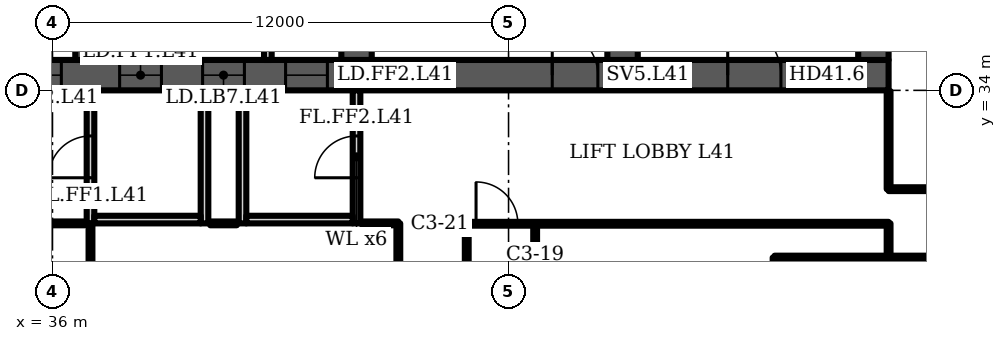
"""IFC4 building model, lengths in metres.
Left out: names, types, materials, properties, quantities, classifications, styles, units other than length and angle.
Written with IfcOpenShell. Run it as: python <this file> out.ifc"""

import sys

from ifc_helpers import new_model, si_unit, direction, frame, frame_2d, origin, place, context, subcontext, project, spatial, polyline, rectangle, outline, extrude, element, fill, save


model = new_model("IFC4")
c1 = context("Model", 3, precision=1e-05, world=origin(), true_north=direction((0.0, 1.0)))
c2 = subcontext(c1, "Body", "Model", "MODEL_VIEW")
j1 = project(units=[si_unit("LENGTHUNIT", "METRE"), si_unit("PLANEANGLEUNIT", "RADIAN")], contexts=[c1])
p1 = place(None, origin())
s1 = spatial("IfcSite", under=j1, at=p1, CompositionType="ELEMENT")
p2 = place(p1, origin())
s2 = spatial("IfcBuilding", under=s1, at=p2, CompositionType="ELEMENT")
p3 = place(p2, frame((0.0, 0.0, 169.9)))
s3 = spatial("IfcBuildingStorey", under=s2, at=p3, CompositionType="ELEMENT", Elevation=169.9)
p4 = place(p3, frame((16.0, 34.4, 0.0), z_axis=(0.0, 0.0, 1.0), x_axis=(1.0, 0.0, 0.0)))
e1 = element("IfcWall", 1, at=p4, inside=s3, PredefinedType="SHEAR", context=c2, shape_type="SweptSolid", body=[
    extrude(rectangle(XDim=42.0, YDim=0.8, at=frame_2d((21.0, 0.0))), origin(), (0.0, 0.0, 1.0), 3.6),
])
p5 = place(p4, frame((1.75, 0.0, 0.0)))
e2 = element("IfcOpeningElement", 2, at=p5, cuts=e1, PredefinedType="OPENING", context=c2, shape_type="SweptSolid", body=[
    extrude(rectangle(XDim=1.0, YDim=2.1, at=frame_2d((0.5, 1.05))), frame((0.0, 0.41, 0.0), z_axis=(0.0, -1.0, 0.0), x_axis=(1.0, 0.0, 0.0)), (0.0, 0.0, 1.0), 0.82),
])
p6 = place(p4, frame((4.65, 0.0, 0.0)))
e3 = element("IfcOpeningElement", 3, at=p6, cuts=e1, PredefinedType="OPENING", context=c2, shape_type="SweptSolid", body=[
    extrude(rectangle(XDim=1.0, YDim=2.1, at=frame_2d((0.5, 1.05))), frame((0.0, 0.41, 0.0), z_axis=(0.0, -1.0, 0.0), x_axis=(1.0, 0.0, 0.0)), (0.0, 0.0, 1.0), 0.82),
])
p7 = place(p4, frame((7.65, 0.0, 0.0)))
e4 = element("IfcOpeningElement", 4, at=p7, cuts=e1, PredefinedType="OPENING", context=c2, shape_type="SweptSolid", body=[
    extrude(rectangle(XDim=1.2, YDim=2.1, at=frame_2d((0.6, 1.05))), frame((0.0, 0.41, 0.0), z_axis=(0.0, -1.0, 0.0), x_axis=(1.0, 0.0, 0.0)), (0.0, 0.0, 1.0), 0.82),
])
p8 = place(p4, frame((14.767, 0.0, 0.0)))
e5 = element("IfcOpeningElement", 5, at=p8, cuts=e1, PredefinedType="OPENING", context=c2, shape_type="SweptSolid", body=[
    extrude(rectangle(XDim=1.1, YDim=2.1, at=frame_2d((0.55, 1.05))), frame((0.0, 0.41, 0.0), z_axis=(0.0, -1.0, 0.0), x_axis=(1.0, 0.0, 0.0)), (0.0, 0.0, 1.0), 0.82),
])
p9 = place(p4, frame((19.133, 0.0, 0.0)))
e6 = element("IfcOpeningElement", 6, at=p9, cuts=e1, PredefinedType="OPENING", context=c2, shape_type="SweptSolid", body=[
    extrude(rectangle(XDim=1.1, YDim=2.1, at=frame_2d((0.55, 1.05))), frame((0.0, 0.41, 0.0), z_axis=(0.0, -1.0, 0.0), x_axis=(1.0, 0.0, 0.0)), (0.0, 0.0, 1.0), 0.82),
])
p10 = place(p4, frame((16.8, 0.0, 0.0)))
e7 = element("IfcOpeningElement", 7, at=p10, cuts=e1, PredefinedType="OPENING", context=c2, shape_type="SweptSolid", body=[
    extrude(rectangle(XDim=1.4, YDim=2.1, at=frame_2d((0.7, 1.05))), frame((0.0, 0.41, 0.0), z_axis=(0.0, -1.0, 0.0), x_axis=(1.0, 0.0, 0.0)), (0.0, 0.0, 1.0), 0.82),
])
p11 = place(p4, frame((21.767, 0.0, 0.0)))
e8 = element("IfcOpeningElement", 8, at=p11, cuts=e1, PredefinedType="OPENING", context=c2, shape_type="SweptSolid", body=[
    extrude(rectangle(XDim=1.1, YDim=2.1, at=frame_2d((0.55, 1.05))), frame((0.0, 0.41, 0.0), z_axis=(0.0, -1.0, 0.0), x_axis=(1.0, 0.0, 0.0)), (0.0, 0.0, 1.0), 0.82),
])
p12 = place(p4, frame((23.95, 0.0, 0.0)))
e9 = element("IfcOpeningElement", 9, at=p12, cuts=e1, PredefinedType="OPENING", context=c2, shape_type="SweptSolid", body=[
    extrude(rectangle(XDim=1.1, YDim=2.1, at=frame_2d((0.55, 1.05))), frame((0.0, 0.41, 0.0), z_axis=(0.0, -1.0, 0.0), x_axis=(1.0, 0.0, 0.0)), (0.0, 0.0, 1.0), 0.82),
])
p13 = place(p4, frame((26.133, 0.0, 0.0)))
e10 = element("IfcOpeningElement", 10, at=p13, cuts=e1, PredefinedType="OPENING", context=c2, shape_type="SweptSolid", body=[
    extrude(rectangle(XDim=1.1, YDim=2.1, at=frame_2d((0.55, 1.05))), frame((0.0, 0.41, 0.0), z_axis=(0.0, -1.0, 0.0), x_axis=(1.0, 0.0, 0.0)), (0.0, 0.0, 1.0), 0.82),
])
p14 = place(p4, frame((33.15, 0.0, 0.0)))
e11 = element("IfcOpeningElement", 11, at=p14, cuts=e1, PredefinedType="OPENING", context=c2, shape_type="SweptSolid", body=[
    extrude(rectangle(XDim=1.2, YDim=2.1, at=frame_2d((0.6, 1.05))), frame((0.0, 0.41, 0.0), z_axis=(0.0, -1.0, 0.0), x_axis=(1.0, 0.0, 0.0)), (0.0, 0.0, 1.0), 0.82),
])
p15 = place(p4, frame((37.767, 0.0, 0.0)))
e12 = element("IfcOpeningElement", 12, at=p15, cuts=e1, PredefinedType="OPENING", context=c2, shape_type="SweptSolid", body=[
    extrude(rectangle(XDim=1.4, YDim=2.1, at=frame_2d((0.7, 1.05))), frame((0.0, 0.41, 0.0), z_axis=(0.0, -1.0, 0.0), x_axis=(1.0, 0.0, 0.0)), (0.0, 0.0, 1.0), 0.82),
])
p16 = place(p3, frame((37.0, 34.8, 0.0), z_axis=(0.0, 0.0, 1.0), x_axis=(0.0, 1.0, 0.0)))
e13 = element("IfcWall", 13, at=p16, inside=s3, PredefinedType="SHEAR", context=c2, shape_type="SweptSolid", body=[
    extrude(rectangle(XDim=14.987, YDim=0.8, at=frame_2d((7.493, 0.0))), origin(), (0.0, 0.0, 1.0), 3.6),
])
p17 = place(p16, frame((11.312, 0.0, 0.0)))
e14 = element("IfcOpeningElement", 14, at=p17, cuts=e13, PredefinedType="OPENING", context=c2, shape_type="SweptSolid", body=[
    extrude(rectangle(XDim=1.0, YDim=2.1, at=frame_2d((0.5, 1.05))), frame((0.0, 0.41, 0.0), z_axis=(0.0, -1.0, 0.0), x_axis=(1.0, 0.0, 0.0)), (0.0, 0.0, 1.0), 0.82),
])
p18 = place(p16, frame((3.6, 0.0, 0.0)))
e15 = element("IfcOpeningElement", 15, at=p18, cuts=e13, PredefinedType="OPENING", context=c2, shape_type="SweptSolid", body=[
    extrude(rectangle(XDim=1.1, YDim=2.1, at=frame_2d((0.55, 1.05))), frame((0.0, 0.41, 0.0), z_axis=(0.0, -1.0, 0.0), x_axis=(1.0, 0.0, 0.0)), (0.0, 0.0, 1.0), 0.82),
])
p19 = place(p3, frame((44.0, 34.8, 0.0), z_axis=(0.0, 0.0, 1.0), x_axis=(0.0, 1.0, 0.0)))
e16 = element("IfcWall", 16, at=p19, inside=s3, PredefinedType="SHEAR", context=c2, shape_type="SweptSolid", body=[
    extrude(rectangle(XDim=14.374, YDim=0.8, at=frame_2d((7.187, 0.0))), origin(), (0.0, 0.0, 1.0), 3.6),
])
p20 = place(p19, frame((11.312, 0.0, 0.0)))
e17 = element("IfcOpeningElement", 17, at=p20, cuts=e16, PredefinedType="OPENING", context=c2, shape_type="SweptSolid", body=[
    extrude(rectangle(XDim=1.0, YDim=2.1, at=frame_2d((0.5, 1.05))), frame((0.0, 0.41, 0.0), z_axis=(0.0, -1.0, 0.0), x_axis=(1.0, 0.0, 0.0)), (0.0, 0.0, 1.0), 0.82),
])
p21 = place(p19, frame((3.6, 0.0, 0.0)))
e18 = element("IfcOpeningElement", 18, at=p21, cuts=e16, PredefinedType="OPENING", context=c2, shape_type="SweptSolid", body=[
    extrude(rectangle(XDim=1.1, YDim=2.1, at=frame_2d((0.55, 1.05))), frame((0.0, 0.41, 0.0), z_axis=(0.0, -1.0, 0.0), x_axis=(1.0, 0.0, 0.0)), (0.0, 0.0, 1.0), 0.82),
])
p22 = place(p3, frame((51.0, 34.8, 0.0), z_axis=(0.0, 0.0, 1.0), x_axis=(0.0, 1.0, 0.0)))
e19 = element("IfcWall", 19, at=p22, inside=s3, PredefinedType="SHEAR", context=c2, shape_type="SweptSolid", body=[
    extrude(rectangle(XDim=13.762, YDim=0.8, at=frame_2d((6.881, 0.0))), origin(), (0.0, 0.0, 1.0), 3.6),
])
p23 = place(p22, frame((3.6, 0.0, 0.0)))
e20 = element("IfcOpeningElement", 20, at=p23, cuts=e19, PredefinedType="OPENING", context=c2, shape_type="SweptSolid", body=[
    extrude(rectangle(XDim=1.1, YDim=2.1, at=frame_2d((0.55, 1.05))), frame((0.0, 0.41, 0.0), z_axis=(0.0, -1.0, 0.0), x_axis=(1.0, 0.0, 0.0)), (0.0, 0.0, 1.0), 0.82),
])
p24 = place(p3, frame((57.6, 34.8, 0.0), z_axis=(0.0, 0.0, 1.0), x_axis=(0.0, 1.0, 0.0)))
e21 = element("IfcWall", 21, at=p24, inside=s3, PredefinedType="SHEAR", context=c2, shape_type="SweptSolid", body=[
    extrude(rectangle(XDim=13.184, YDim=0.8, at=frame_2d((6.592, 0.0))), origin(), (0.0, 0.0, 1.0), 3.6),
])
p25 = place(p3, origin())
e22 = element("IfcWall", 22, at=p25, inside=s3, PredefinedType="PARTITIONING", context=c2, shape_type="SweptSolid", body=[
    extrude(outline(polyline([(34.567, 37.85), (34.767, 37.85), (36.6, 37.85), (36.6, 37.65), (34.767, 37.65), (34.767, 34.8), (34.567, 34.8), (34.567, 37.85)])), origin(), (0.0, 0.0, 1.0), 3.2),
])
p26 = place(p3, origin())
e23 = element("IfcWall", 23, at=p26, inside=s3, PredefinedType="PARTITIONING", context=c2, shape_type="SweptSolid", body=[
    extrude(outline(polyline([(41.567, 37.1), (39.433, 37.1), (39.433, 34.8), (39.233, 34.8), (39.233, 37.65), (37.4, 37.65), (37.4, 37.85), (39.233, 37.85), (39.433, 37.85), (39.433, 37.3), (41.567, 37.3), (41.567, 37.55), (41.767, 37.55), (43.6, 37.55), (43.6, 37.35), (41.767, 37.35), (41.767, 34.8), (41.567, 34.8), (41.567, 37.1)])), origin(), (0.0, 0.0, 1.0), 3.2),
])
p27 = place(p3, frame((37.0, 30.5, 0.0), z_axis=(0.0, 0.0, 1.0), x_axis=(0.0, 1.0, 0.0)))
e24 = element("IfcWall", 24, at=p27, inside=s3, PredefinedType="PARTITIONING", context=c2, shape_type="SweptSolid", body=[
    extrude(rectangle(XDim=3.5, YDim=0.2, at=frame_2d((1.75, 0.0))), origin(), (0.0, 0.0, 1.0), 3.2),
])
p28 = place(p27, frame((1.2, 0.0, 0.0)))
e25 = element("IfcOpeningElement", 25, at=p28, cuts=e24, PredefinedType="OPENING", context=c2, shape_type="SweptSolid", body=[
    extrude(rectangle(XDim=1.1, YDim=2.1, at=frame_2d((0.55, 1.05))), frame((0.0, 0.11, 0.0), z_axis=(0.0, -1.0, 0.0), x_axis=(1.0, 0.0, 0.0)), (0.0, 0.0, 1.0), 0.22),
])
p29 = place(p3, frame((40.0, 30.5, 0.0), z_axis=(0.0, 0.0, 1.0), x_axis=(0.0, 1.0, 0.0)))
e26 = element("IfcWall", 26, at=p29, inside=s3, PredefinedType="PARTITIONING", context=c2, shape_type="SweptSolid", body=[
    extrude(rectangle(XDim=3.5, YDim=0.2, at=frame_2d((1.75, 0.0))), origin(), (0.0, 0.0, 1.0), 3.2),
])
p30 = place(p3, frame((37.1, 30.6, 0.0), z_axis=(0.0, 0.0, 1.0), x_axis=(1.0, 0.0, 0.0)))
e27 = element("IfcWall", 27, at=p30, inside=s3, PredefinedType="PARTITIONING", context=c2, shape_type="SweptSolid", body=[
    extrude(rectangle(XDim=2.8, YDim=0.2, at=frame_2d((1.4, 0.0))), origin(), (0.0, 0.0, 1.0), 3.2),
])
p31 = place(p3, frame((41.0, 30.5, 0.0), z_axis=(0.0, 0.0, 1.0), x_axis=(0.0, 1.0, 0.0)))
e28 = element("IfcWall", 28, at=p31, inside=s3, PredefinedType="PARTITIONING", context=c2, shape_type="SweptSolid", body=[
    extrude(rectangle(XDim=3.5, YDim=0.2, at=frame_2d((1.75, 0.0))), origin(), (0.0, 0.0, 1.0), 3.2),
])
p32 = place(p3, frame((44.0, 30.5, 0.0), z_axis=(0.0, 0.0, 1.0), x_axis=(0.0, 1.0, 0.0)))
e29 = element("IfcWall", 29, at=p32, inside=s3, PredefinedType="PARTITIONING", context=c2, shape_type="SweptSolid", body=[
    extrude(rectangle(XDim=3.5, YDim=0.2, at=frame_2d((1.75, 0.0))), origin(), (0.0, 0.0, 1.0), 3.2),
])
p33 = place(p32, frame((1.2, 0.0, 0.0)))
e30 = element("IfcOpeningElement", 30, at=p33, cuts=e29, PredefinedType="OPENING", context=c2, shape_type="SweptSolid", body=[
    extrude(rectangle(XDim=1.1, YDim=2.1, at=frame_2d((0.55, 1.05))), frame((0.0, 0.11, 0.0), z_axis=(0.0, -1.0, 0.0), x_axis=(1.0, 0.0, 0.0)), (0.0, 0.0, 1.0), 0.22),
])
p34 = place(p3, frame((41.1, 30.6, 0.0), z_axis=(0.0, 0.0, 1.0), x_axis=(1.0, 0.0, 0.0)))
e31 = element("IfcWall", 31, at=p34, inside=s3, PredefinedType="PARTITIONING", context=c2, shape_type="SweptSolid", body=[
    extrude(rectangle(XDim=2.8, YDim=0.2, at=frame_2d((1.4, 0.0))), origin(), (0.0, 0.0, 1.0), 3.2),
])
p35 = place(p3, frame((27.4, 30.5, 0.0), z_axis=(0.0, 0.0, 1.0), x_axis=(1.0, 0.0, 0.0)))
e32 = element("IfcWall", 32, at=p35, inside=s3, PredefinedType="PARTITIONING", context=c2, shape_type="SweptSolid", body=[
    extrude(rectangle(XDim=9.45, YDim=0.1, at=frame_2d((4.725, 0.0))), origin(), (0.0, 0.0, 1.0), 3.2),
])
p36 = place(p35, frame((2.87, 0.0, 0.0)))
e33 = element("IfcOpeningElement", 33, at=p36, cuts=e32, PredefinedType="OPENING", context=c2, shape_type="SweptSolid", body=[
    extrude(rectangle(XDim=1.0, YDim=2.1, at=frame_2d((0.5, 1.05))), frame((0.0, 0.06, 0.0), z_axis=(0.0, -1.0, 0.0), x_axis=(1.0, 0.0, 0.0)), (0.0, 0.0, 1.0), 0.12),
])
p37 = place(p3, frame((37.0, 15.745, 0.0), z_axis=(0.0, 0.0, 1.0), x_axis=(0.0, 1.0, 0.0)))
e34 = element("IfcWall", 34, at=p37, inside=s3, PredefinedType="PARTITIONING", context=c2, shape_type="SweptSolid", body=[
    extrude(rectangle(XDim=14.755, YDim=0.1, at=frame_2d((7.377, 0.0))), origin(), (0.0, 0.0, 1.0), 3.2),
])
p38 = place(p3, frame((45.1, 1.087, 0.0), z_axis=(0.0, 0.0, 1.0), x_axis=(0.0, 1.0, 0.0)))
e35 = element("IfcWall", 35, at=p38, inside=s3, PredefinedType="PARTITIONING", context=c2, shape_type="SweptSolid", body=[
    extrude(rectangle(XDim=29.413, YDim=0.1, at=frame_2d((14.707, 0.0))), origin(), (0.0, 0.0, 1.0), 3.2),
])
p39 = place(p38, frame((6.438, 0.0, 0.0)))
e36 = element("IfcOpeningElement", 36, at=p39, cuts=e35, PredefinedType="OPENING", context=c2, shape_type="SweptSolid", body=[
    extrude(rectangle(XDim=1.8, YDim=2.1, at=frame_2d((0.9, 1.05))), frame((0.0, 0.06, 0.0), z_axis=(0.0, -1.0, 0.0), x_axis=(1.0, 0.0, 0.0)), (0.0, 0.0, 1.0), 0.12),
])
p40 = place(p38, frame((21.993, 0.0, 0.0)))
e37 = element("IfcOpeningElement", 37, at=p40, cuts=e35, PredefinedType="OPENING", context=c2, shape_type="SweptSolid", body=[
    extrude(rectangle(XDim=1.0, YDim=2.1, at=frame_2d((0.5, 1.05))), frame((0.0, 0.06, 0.0), z_axis=(0.0, -1.0, 0.0), x_axis=(1.0, 0.0, 0.0)), (0.0, 0.0, 1.0), 0.12),
])
p41 = place(p3, frame((46.9, 1.087, 0.0), z_axis=(0.0, 0.0, 1.0), x_axis=(0.0, 1.0, 0.0)))
e38 = element("IfcWall", 38, at=p41, inside=s3, PredefinedType="PARTITIONING", context=c2, shape_type="SweptSolid", body=[
    extrude(rectangle(XDim=29.403, YDim=0.1, at=frame_2d((14.702, 0.0))), origin(), (0.0, 0.0, 1.0), 3.2),
])
p42 = place(p41, frame((6.798, 0.0, 0.0)))
e39 = element("IfcOpeningElement", 39, at=p42, cuts=e38, PredefinedType="OPENING", context=c2, shape_type="SweptSolid", body=[
    extrude(rectangle(XDim=1.0, YDim=2.1, at=frame_2d((0.5, 1.05))), frame((0.0, 0.06, 0.0), z_axis=(0.0, -1.0, 0.0), x_axis=(1.0, 0.0, 0.0)), (0.0, 0.0, 1.0), 0.12),
])
p43 = place(p3, frame((46.91, 30.49, 0.0), z_axis=(0.0, 0.0, 1.0), x_axis=(1.0, 0.0, 0.0)))
e40 = element("IfcWall", 40, at=p43, inside=s3, PredefinedType="PARTITIONING", context=c2, shape_type="SweptSolid", body=[
    extrude(rectangle(XDim=11.09, YDim=0.1, at=frame_2d((5.545, 0.0))), origin(), (0.0, 0.0, 1.0), 3.2),
])
p44 = place(p43, frame((0.235, 0.0, 0.0)))
e41 = element("IfcOpeningElement", 41, at=p44, cuts=e40, PredefinedType="OPENING", context=c2, shape_type="SweptSolid", body=[
    extrude(rectangle(XDim=1.1, YDim=2.1, at=frame_2d((0.55, 1.05))), frame((0.0, 0.06, 0.0), z_axis=(0.0, -1.0, 0.0), x_axis=(1.0, 0.0, 0.0)), (0.0, 0.0, 1.0), 0.12),
])
p45 = place(p3, frame((48.7, 15.745, 0.0), z_axis=(0.0, 0.0, 1.0), x_axis=(0.0, 1.0, 0.0)))
e42 = element("IfcWall", 42, at=p45, inside=s3, PredefinedType="PARTITIONING", context=c2, shape_type="SweptSolid", body=[
    extrude(rectangle(XDim=14.745, YDim=0.1, at=frame_2d((7.373, 0.0))), origin(), (0.0, 0.0, 1.0), 3.2),
])
p46 = place(p45, frame((2.469, 0.0, 0.0)))
e43 = element("IfcOpeningElement", 43, at=p46, cuts=e42, PredefinedType="OPENING", context=c2, shape_type="SweptSolid", body=[
    extrude(rectangle(XDim=0.9, YDim=2.1, at=frame_2d((0.45, 1.05))), frame((0.0, 0.06, 0.0), z_axis=(0.0, -1.0, 0.0), x_axis=(1.0, 0.0, 0.0)), (0.0, 0.0, 1.0), 0.12),
])
p47 = place(p45, frame((8.099, 0.0, 0.0)))
e44 = element("IfcOpeningElement", 44, at=p47, cuts=e42, PredefinedType="OPENING", context=c2, shape_type="SweptSolid", body=[
    extrude(rectangle(XDim=0.9, YDim=2.1, at=frame_2d((0.45, 1.05))), frame((0.0, 0.06, 0.0), z_axis=(0.0, -1.0, 0.0), x_axis=(1.0, 0.0, 0.0)), (0.0, 0.0, 1.0), 0.12),
])
p48 = place(p45, frame((12.434, 0.0, 0.0)))
e45 = element("IfcOpeningElement", 45, at=p48, cuts=e42, PredefinedType="OPENING", context=c2, shape_type="SweptSolid", body=[
    extrude(rectangle(XDim=1.0, YDim=2.1, at=frame_2d((0.5, 1.05))), frame((0.0, 0.06, 0.0), z_axis=(0.0, -1.0, 0.0), x_axis=(1.0, 0.0, 0.0)), (0.0, 0.0, 1.0), 0.12),
])
p49 = place(p3, frame((55.0, 15.745, 0.0), z_axis=(0.0, 0.0, 1.0), x_axis=(0.0, 1.0, 0.0)))
e46 = element("IfcWall", 46, at=p49, inside=s3, PredefinedType="PARTITIONING", context=c2, shape_type="SweptSolid", body=[
    extrude(rectangle(XDim=13.855, YDim=0.1, at=frame_2d((6.927, 0.0))), origin(), (0.0, 0.0, 1.0), 3.2),
])
p50 = place(p3, frame((55.0, 29.6, 0.0), z_axis=(0.0, 0.0, 1.0), x_axis=(1.0, 0.0, 0.0)))
e47 = element("IfcWall", 47, at=p50, inside=s3, PredefinedType="PARTITIONING", context=c2, shape_type="SweptSolid", body=[
    extrude(rectangle(XDim=6.44, YDim=0.1, at=frame_2d((3.22, 0.0))), origin(), (0.0, 0.0, 1.0), 3.2),
])
p51 = place(p3, frame((58.0, 29.6, 0.0), z_axis=(0.0, 0.0, 1.0), x_axis=(0.0, 1.0, 0.0)))
e48 = element("IfcWall", 48, at=p51, inside=s3, PredefinedType="PARTITIONING", context=c2, shape_type="SweptSolid", body=[
    extrude(rectangle(XDim=0.9, YDim=0.1, at=frame_2d((0.45, 0.0))), origin(), (0.0, 0.0, 1.0), 3.2),
])
p52 = place(p3, frame((58.0, 31.4, 0.0), z_axis=(0.0, 0.0, 1.0), x_axis=(0.0, 1.0, 0.0)))
e49 = element("IfcWall", 49, at=p52, inside=s3, PredefinedType="PARTITIONING", context=c2, shape_type="SweptSolid", body=[
    extrude(rectangle(XDim=2.58, YDim=0.1, at=frame_2d((1.29, 0.0))), origin(), (0.0, 0.0, 1.0), 3.2),
])
p53 = place(p3, frame((58.0, 31.4, 0.0), z_axis=(0.0, 0.0, 1.0), x_axis=(1.0, 0.0, 0.0)))
e50 = element("IfcWall", 50, at=p53, inside=s3, PredefinedType="PARTITIONING", context=c2, shape_type="SweptSolid", body=[
    extrude(rectangle(XDim=8.4, YDim=0.1, at=frame_2d((4.2, 0.0))), origin(), (0.0, 0.0, 1.0), 3.2),
])
p54 = place(p53, frame((3.98, 0.0, 0.0)))
e51 = element("IfcOpeningElement", 51, at=p54, cuts=e50, PredefinedType="OPENING", context=c2, shape_type="SweptSolid", body=[
    extrude(rectangle(XDim=1.8, YDim=2.1, at=frame_2d((0.9, 1.05))), frame((0.0, 0.06, 0.0), z_axis=(0.0, -1.0, 0.0), x_axis=(1.0, 0.0, 0.0)), (0.0, 0.0, 1.0), 0.12),
])
p55 = place(p3, frame((40.15, 30.5, 0.0), z_axis=(0.0, 0.0, 1.0), x_axis=(1.0, 0.0, 0.0)))
e52 = element("IfcWall", 52, at=p55, inside=s3, PredefinedType="PARTITIONING", context=c2, shape_type="SweptSolid", body=[
    extrude(rectangle(XDim=0.7, YDim=0.1, at=frame_2d((0.35, 0.0))), origin(), (0.0, 0.0, 1.0), 3.2),
])
p56 = place(p3, frame((44.15, 30.5, 0.0), z_axis=(0.0, 0.0, 1.0), x_axis=(1.0, 0.0, 0.0)))
e53 = element("IfcWall", 53, at=p56, inside=s3, PredefinedType="PARTITIONING", context=c2, shape_type="SweptSolid", body=[
    extrude(rectangle(XDim=0.95, YDim=0.1, at=frame_2d((0.475, 0.0))), origin(), (0.0, 0.0, 1.0), 3.2),
])
p57 = place(p9, origin())
e54 = element("IfcDoor", 54, at=p57, inside=s3, OperationType="DOUBLE_DOOR_SLIDING", PredefinedType="DOOR", context=c2, shape_type="SweptSolid", body=[
    extrude(rectangle(XDim=1.1, YDim=2.1, at=frame_2d((0.55, 1.05))), frame((0.0, 0.025, 0.0), z_axis=(0.0, -1.0, 0.0), x_axis=(1.0, 0.0, 0.0)), (0.0, 0.0, 1.0), 0.05),
])
fill(e6, e54)
p58 = place(p11, origin())
e55 = element("IfcDoor", 55, at=p58, inside=s3, OperationType="DOUBLE_DOOR_SLIDING", PredefinedType="DOOR", context=c2, shape_type="SweptSolid", body=[
    extrude(rectangle(XDim=1.1, YDim=2.1, at=frame_2d((0.55, 1.05))), frame((0.0, 0.025, 0.0), z_axis=(0.0, -1.0, 0.0), x_axis=(1.0, 0.0, 0.0)), (0.0, 0.0, 1.0), 0.05),
])
fill(e8, e55)
p59 = place(p12, origin())
e56 = element("IfcDoor", 56, at=p59, inside=s3, OperationType="DOUBLE_DOOR_SLIDING", PredefinedType="DOOR", context=c2, shape_type="SweptSolid", body=[
    extrude(rectangle(XDim=1.1, YDim=2.1, at=frame_2d((0.55, 1.05))), frame((0.0, 0.025, 0.0), z_axis=(0.0, -1.0, 0.0), x_axis=(1.0, 0.0, 0.0)), (0.0, 0.0, 1.0), 0.05),
])
fill(e9, e56)
p60 = place(p13, origin())
e57 = element("IfcDoor", 57, at=p60, inside=s3, OperationType="DOUBLE_DOOR_SLIDING", PredefinedType="DOOR", context=c2, shape_type="SweptSolid", body=[
    extrude(rectangle(XDim=1.1, YDim=2.1, at=frame_2d((0.55, 1.05))), frame((0.0, 0.025, 0.0), z_axis=(0.0, -1.0, 0.0), x_axis=(1.0, 0.0, 0.0)), (0.0, 0.0, 1.0), 0.05),
])
fill(e10, e57)
p61 = place(p14, origin())
e58 = element("IfcDoor", 58, at=p61, inside=s3, OperationType="SINGLE_SWING_LEFT", PredefinedType="DOOR", context=c2, shape_type="SweptSolid", body=[
    extrude(rectangle(XDim=1.2, YDim=2.1, at=frame_2d((0.6, 1.05))), frame((0.0, 0.025, 0.0), z_axis=(0.0, -1.0, 0.0), x_axis=(1.0, 0.0, 0.0)), (0.0, 0.0, 1.0), 0.05),
])
fill(e11, e58)
p62 = place(p15, origin())
e59 = element("IfcDoor", 59, at=p62, inside=s3, OperationType="DOUBLE_DOOR_SINGLE_SWING", PredefinedType="DOOR", context=c2, shape_type="SweptSolid", body=[
    extrude(rectangle(XDim=1.4, YDim=2.1, at=frame_2d((0.7, 1.05))), frame((0.0, 0.025, 0.0), z_axis=(0.0, -1.0, 0.0), x_axis=(1.0, 0.0, 0.0)), (0.0, 0.0, 1.0), 0.05),
])
fill(e12, e59)
p63 = place(p28, origin())
e60 = element("IfcDoor", 60, at=p63, inside=s3, OperationType="SINGLE_SWING_LEFT", PredefinedType="DOOR", context=c2, shape_type="SweptSolid", body=[
    extrude(rectangle(XDim=1.1, YDim=2.1, at=frame_2d((0.55, 1.05))), frame((0.0, 0.025, 0.0), z_axis=(0.0, -1.0, 0.0), x_axis=(1.0, 0.0, 0.0)), (0.0, 0.0, 1.0), 0.05),
])
fill(e25, e60)
p64 = place(p33, origin())
e61 = element("IfcDoor", 61, at=p64, inside=s3, OperationType="SINGLE_SWING_LEFT", PredefinedType="DOOR", context=c2, shape_type="SweptSolid", body=[
    extrude(rectangle(XDim=1.1, YDim=2.1, at=frame_2d((0.55, 1.05))), frame((0.0, 0.025, 0.0), z_axis=(0.0, -1.0, 0.0), x_axis=(1.0, 0.0, 0.0)), (0.0, 0.0, 1.0), 0.05),
])
fill(e30, e61)
p65 = place(p44, origin())
e62 = element("IfcDoor", 62, at=p65, inside=s3, OperationType="SINGLE_SWING_LEFT", PredefinedType="DOOR", context=c2, shape_type="SweptSolid", body=[
    extrude(rectangle(XDim=1.1, YDim=2.1, at=frame_2d((0.55, 1.05))), frame((0.0, 0.025, 0.0), z_axis=(0.0, -1.0, 0.0), x_axis=(1.0, 0.0, 0.0)), (0.0, 0.0, 1.0), 0.05),
])
fill(e41, e62)
save(model, sys.argv[1])
